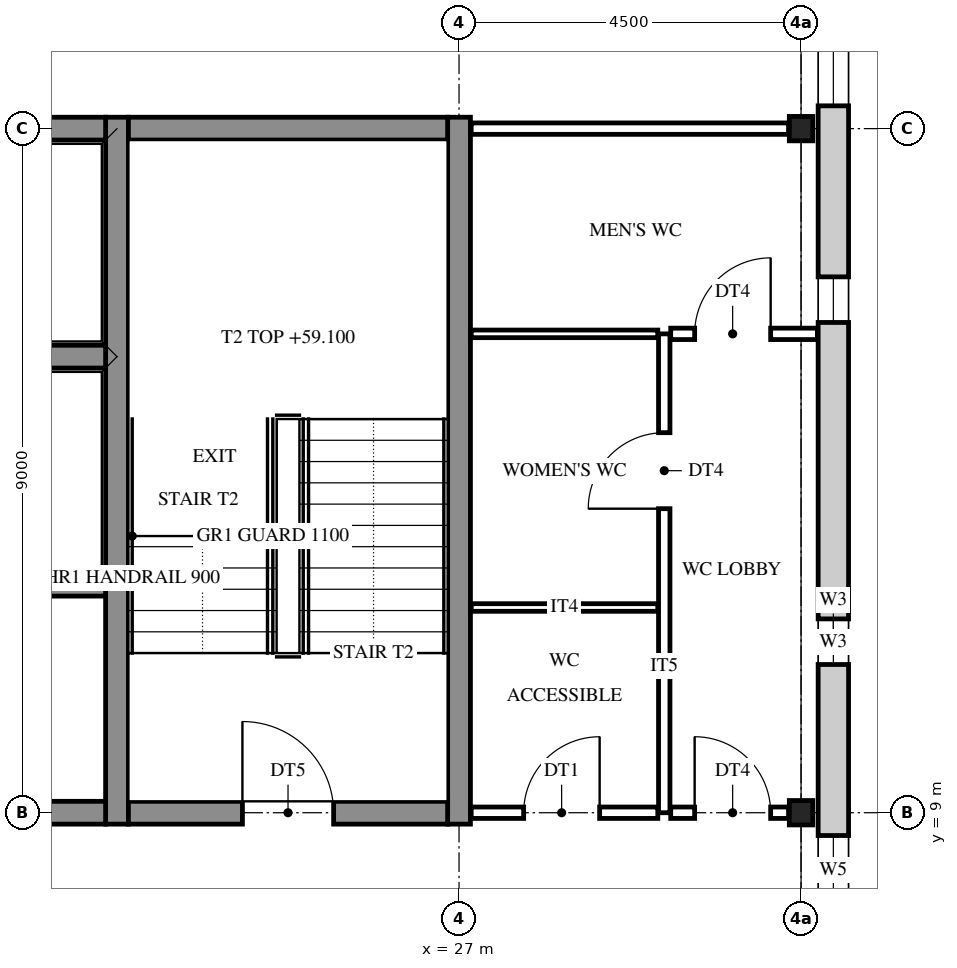
"""IFC4 building model, lengths in metres.
Left out: names, types, materials, properties, quantities, classifications, styles, units other than length and angle.
Written with IfcOpenShell. Run it as: python <this file> out.ifc"""

import sys

from ifc_helpers import new_model, si_unit, direction, frame, frame_2d, origin, origin_2d, place, context, subcontext, project, spatial, rectangle, i_section, extrude, element, fill, save


model = new_model("IFC4")
c1 = context("Model", 3, precision=1e-05, world=origin(), true_north=direction((0.0, 1.0)))
c2 = subcontext(c1, "Body", "Model", "MODEL_VIEW")
j1 = project(units=[si_unit("LENGTHUNIT", "METRE"), si_unit("PLANEANGLEUNIT", "RADIAN")], contexts=[c1])
p1 = place(None, origin())
s1 = spatial("IfcSite", under=j1, at=p1, CompositionType="ELEMENT")
p2 = place(p1, origin())
s2 = spatial("IfcBuilding", under=s1, at=p2, CompositionType="ELEMENT")
p3 = place(p2, frame((0.0, 0.0, 57.0)))
s3 = spatial("IfcBuildingStorey", under=s2, at=p3, CompositionType="ELEMENT", Elevation=57.0)
for number, where, z_axis, x_axis in (
    (1, (31.5, 9.0, 0.0), (0.0, 0.0, 1.0), (1.0, 0.0, 0.0)),
    (2, (31.5, 18.0, 0.0), (0.0, 0.0, 1.0), (1.0, 0.0, 0.0)),
):
    element("IfcColumn", number, at=place(p3, frame(where, z_axis=z_axis, x_axis=x_axis)), inside=s3, PredefinedType="COLUMN", context=c2, shape_type="SweptSolid", body=[
        extrude(i_section(OverallWidth=0.309, OverallDepth=0.321, WebThickness=0.014, FlangeThickness=0.022, FilletRadius=0.017, at=origin_2d()), origin(), (0.0, 0.0, 1.0), 4.2),
    ])
for number, where, z_axis, x_axis in (
    (3, (22.5, 8.85, 0.0), (0.0, 0.0, 1.0), (0.0, 1.0, 0.0)),
    (4, (27.0, 8.85, 0.0), (0.0, 0.0, 1.0), (0.0, 1.0, 0.0)),
):
    element("IfcWall", number, at=place(p3, frame(where, z_axis=z_axis, x_axis=x_axis)), inside=s3, PredefinedType="SHEAR", context=c2, shape_type="SweptSolid", body=[
        extrude(rectangle(XDim=9.3, YDim=0.3, at=frame_2d((4.65, 0.0))), origin(), (0.0, 0.0, 1.0), 4.2),
    ])
p4 = place(p3, frame((19.65, 9.0, 0.0), z_axis=(0.0, 0.0, 1.0), x_axis=(1.0, 0.0, 0.0)))
e5 = element("IfcWall", 5, at=p4, inside=s3, PredefinedType="SHEAR", context=c2, shape_type="SweptSolid", body=[
    extrude(rectangle(XDim=2.7, YDim=0.3, at=frame_2d((1.35, 0.0))), origin(), (0.0, 0.0, 1.0), 4.2),
])
p5 = place(p3, frame((22.65, 9.0, 0.0), z_axis=(0.0, 0.0, 1.0), x_axis=(1.0, 0.0, 0.0)))
e6 = element("IfcWall", 6, at=p5, inside=s3, PredefinedType="SHEAR", context=c2, shape_type="SweptSolid", body=[
    extrude(rectangle(XDim=4.2, YDim=0.3, at=frame_2d((2.1, 0.0))), origin(), (0.0, 0.0, 1.0), 4.2),
])
p6 = place(p5, frame((1.5, 0.0, 0.0)))
e7 = element("IfcOpeningElement", 7, at=p6, cuts=e6, PredefinedType="OPENING", context=c2, shape_type="SweptSolid", body=[
    extrude(rectangle(XDim=1.2, YDim=2.1, at=frame_2d((0.6, 1.05))), frame((0.0, 0.16, 0.0), z_axis=(0.0, -1.0, 0.0), x_axis=(1.0, 0.0, 0.0)), (0.0, 0.0, 1.0), 0.32),
])
for number, where, z_axis, x_axis in (
    (8, (19.65, 12.0, 0.0), (0.0, 0.0, 1.0), (1.0, 0.0, 0.0)),
    (9, (19.65, 15.0, 0.0), (0.0, 0.0, 1.0), (1.0, 0.0, 0.0)),
    (10, (19.65, 18.0, 0.0), (0.0, 0.0, 1.0), (1.0, 0.0, 0.0)),
):
    element("IfcWall", number, at=place(p3, frame(where, z_axis=z_axis, x_axis=x_axis)), inside=s3, PredefinedType="SHEAR", context=c2, shape_type="SweptSolid", body=[
        extrude(rectangle(XDim=2.7, YDim=0.3, at=frame_2d((1.35, 0.0))), origin(), (0.0, 0.0, 1.0), 4.2),
    ])
p7 = place(p3, frame((22.65, 18.0, 0.0), z_axis=(0.0, 0.0, 1.0), x_axis=(1.0, 0.0, 0.0)))
e11 = element("IfcWall", 11, at=p7, inside=s3, PredefinedType="SHEAR", context=c2, shape_type="SweptSolid", body=[
    extrude(rectangle(XDim=4.2, YDim=0.3, at=frame_2d((2.1, 0.0))), origin(), (0.0, 0.0, 1.0), 4.2),
])
p8 = place(p3, frame((31.925, 27.225, 0.0), z_axis=(0.0, 0.0, 1.0), x_axis=(0.0, -1.0, 0.0)))
e12 = element("IfcWall", 12, at=p8, inside=s3, PredefinedType="STANDARD", context=c2, shape_type="SweptSolid", body=[
    extrude(rectangle(XDim=27.45, YDim=0.4, at=frame_2d((13.725, 0.0))), origin(), (0.0, 0.0, 1.0), 4.2),
])
p9 = place(p8, frame((26.025, 0.0, 0.9)))
e13 = element("IfcOpeningElement", 13, at=p9, cuts=e12, PredefinedType="OPENING", context=c2, shape_type="SweptSolid", body=[
    extrude(rectangle(XDim=0.9, YDim=2.0, at=frame_2d((0.45, 1.0))), frame((0.0, 0.21, 0.0), z_axis=(0.0, -1.0, 0.0), x_axis=(1.0, 0.0, 0.0)), (0.0, 0.0, 1.0), 0.42),
])
p10 = place(p8, frame((18.525, 0.0, 0.9)))
e14 = element("IfcOpeningElement", 14, at=p10, cuts=e12, PredefinedType="OPENING", context=c2, shape_type="SweptSolid", body=[
    extrude(rectangle(XDim=0.9, YDim=2.0, at=frame_2d((0.45, 1.0))), frame((0.0, 0.21, 0.0), z_axis=(0.0, -1.0, 0.0), x_axis=(1.0, 0.0, 0.0)), (0.0, 0.0, 1.0), 0.42),
])
p11 = place(p8, frame((15.675, 0.0, 1.6)))
e15 = element("IfcOpeningElement", 15, at=p11, cuts=e12, PredefinedType="OPENING", context=c2, shape_type="SweptSolid", body=[
    extrude(rectangle(XDim=0.6, YDim=0.9, at=frame_2d((0.3, 0.45))), frame((0.0, 0.21, 0.0), z_axis=(0.0, -1.0, 0.0), x_axis=(1.0, 0.0, 0.0)), (0.0, 0.0, 1.0), 0.42),
])
p12 = place(p8, frame((11.175, 0.0, 1.6)))
e16 = element("IfcOpeningElement", 16, at=p12, cuts=e12, PredefinedType="OPENING", context=c2, shape_type="SweptSolid", body=[
    extrude(rectangle(XDim=0.6, YDim=0.9, at=frame_2d((0.3, 0.45))), frame((0.0, 0.21, 0.0), z_axis=(0.0, -1.0, 0.0), x_axis=(1.0, 0.0, 0.0)), (0.0, 0.0, 1.0), 0.42),
])
p13 = place(p8, frame((8.025, 0.0, 0.9)))
e17 = element("IfcOpeningElement", 17, at=p13, cuts=e12, PredefinedType="OPENING", context=c2, shape_type="SweptSolid", body=[
    extrude(rectangle(XDim=0.9, YDim=2.0, at=frame_2d((0.45, 1.0))), frame((0.0, 0.21, 0.0), z_axis=(0.0, -1.0, 0.0), x_axis=(1.0, 0.0, 0.0)), (0.0, 0.0, 1.0), 0.42),
])
p14 = place(p8, frame((0.525, 0.0, 0.9)))
e18 = element("IfcOpeningElement", 18, at=p14, cuts=e12, PredefinedType="OPENING", context=c2, shape_type="SweptSolid", body=[
    extrude(rectangle(XDim=0.9, YDim=2.0, at=frame_2d((0.45, 1.0))), frame((0.0, 0.21, 0.0), z_axis=(0.0, -1.0, 0.0), x_axis=(1.0, 0.0, 0.0)), (0.0, 0.0, 1.0), 0.42),
])
p15 = place(p3, frame((29.7, 9.0, 0.0), z_axis=(0.0, 0.0, 1.0), x_axis=(0.0, 1.0, 0.0)))
e19 = element("IfcWall", 19, at=p15, inside=s3, PredefinedType="PARTITIONING", context=c2, shape_type="SweptSolid", body=[
    extrude(rectangle(XDim=6.3, YDim=0.15, at=frame_2d((3.15, 0.0))), origin(), (0.0, 0.0, 1.0), 3.542),
])
p16 = place(p15, frame((4.0, 0.0, 0.0)))
e20 = element("IfcOpeningElement", 20, at=p16, cuts=e19, PredefinedType="OPENING", context=c2, shape_type="SweptSolid", body=[
    extrude(rectangle(XDim=1.0, YDim=2.1, at=frame_2d((0.5, 1.05))), frame((0.0, 0.085, 0.0), z_axis=(0.0, -1.0, 0.0), x_axis=(1.0, 0.0, 0.0)), (0.0, 0.0, 1.0), 0.17),
])
p17 = place(p3, frame((27.16, 9.0, 0.0), z_axis=(0.0, 0.0, 1.0), x_axis=(1.0, 0.0, 0.0)))
e21 = element("IfcWall", 21, at=p17, inside=s3, PredefinedType="PARTITIONING", context=c2, shape_type="SweptSolid", body=[
    extrude(rectangle(XDim=2.455, YDim=0.15, at=frame_2d((1.228, 0.0))), origin(), (0.0, 0.0, 1.0), 3.542),
])
p18 = place(p17, frame((0.69, 0.0, 0.0)))
e22 = element("IfcOpeningElement", 22, at=p18, cuts=e21, PredefinedType="OPENING", context=c2, shape_type="SweptSolid", body=[
    extrude(rectangle(XDim=1.0, YDim=2.1, at=frame_2d((0.5, 1.05))), frame((0.0, 0.085, 0.0), z_axis=(0.0, -1.0, 0.0), x_axis=(1.0, 0.0, 0.0)), (0.0, 0.0, 1.0), 0.17),
])
p19 = place(p3, frame((29.785, 9.0, 0.0), z_axis=(0.0, 0.0, 1.0), x_axis=(1.0, 0.0, 0.0)))
e23 = element("IfcWall", 23, at=p19, inside=s3, PredefinedType="PARTITIONING", context=c2, shape_type="SweptSolid", body=[
    extrude(rectangle(XDim=1.551, YDim=0.15, at=frame_2d((0.775, 0.0))), origin(), (0.0, 0.0, 1.0), 3.542),
])
p20 = place(p19, frame((0.315, 0.0, 0.0)))
e24 = element("IfcOpeningElement", 24, at=p20, cuts=e23, PredefinedType="OPENING", context=c2, shape_type="SweptSolid", body=[
    extrude(rectangle(XDim=1.0, YDim=2.1, at=frame_2d((0.5, 1.05))), frame((0.0, 0.085, 0.0), z_axis=(0.0, -1.0, 0.0), x_axis=(1.0, 0.0, 0.0)), (0.0, 0.0, 1.0), 0.17),
])
for number, where, z_axis, x_axis in (
    (25, (27.16, 11.7, 0.0), (0.0, 0.0, 1.0), (1.0, 0.0, 0.0)),
    (26, (27.16, 15.3, 0.0), (0.0, 0.0, 1.0), (1.0, 0.0, 0.0)),
):
    element("IfcWall", number, at=place(p3, frame(where, z_axis=z_axis, x_axis=x_axis)), inside=s3, PredefinedType="PARTITIONING", context=c2, shape_type="SweptSolid", body=[
        extrude(rectangle(XDim=2.455, YDim=0.1, at=frame_2d((1.228, 0.0))), origin(), (0.0, 0.0, 1.0), 3.542),
    ])
p21 = place(p3, frame((29.785, 15.3, 0.0), z_axis=(0.0, 0.0, 1.0), x_axis=(1.0, 0.0, 0.0)))
e27 = element("IfcWall", 27, at=p21, inside=s3, PredefinedType="PARTITIONING", context=c2, shape_type="SweptSolid", body=[
    extrude(rectangle(XDim=1.93, YDim=0.15, at=frame_2d((0.965, 0.0))), origin(), (0.0, 0.0, 1.0), 3.542),
])
p22 = place(p21, frame((0.315, 0.0, 0.0)))
e28 = element("IfcOpeningElement", 28, at=p22, cuts=e27, PredefinedType="OPENING", context=c2, shape_type="SweptSolid", body=[
    extrude(rectangle(XDim=1.0, YDim=2.1, at=frame_2d((0.5, 1.05))), frame((0.0, 0.085, 0.0), z_axis=(0.0, -1.0, 0.0), x_axis=(1.0, 0.0, 0.0)), (0.0, 0.0, 1.0), 0.17),
])
p23 = place(p3, frame((27.16, 18.0, 0.0), z_axis=(0.0, 0.0, 1.0), x_axis=(1.0, 0.0, 0.0)))
e29 = element("IfcWall", 29, at=p23, inside=s3, PredefinedType="PARTITIONING", context=c2, shape_type="SweptSolid", body=[
    extrude(rectangle(XDim=4.176, YDim=0.15, at=frame_2d((2.088, 0.0))), origin(), (0.0, 0.0, 1.0), 3.542),
])
p24 = place(p10, origin())
e30 = element("IfcWindow", 30, at=p24, inside=s3, PartitioningType="SINGLE_PANEL", PredefinedType="WINDOW", context=c2, shape_type="SweptSolid", body=[
    extrude(rectangle(XDim=0.9, YDim=2.0, at=frame_2d((0.45, 1.0))), frame((0.0, 0.03, 0.0), z_axis=(0.0, -1.0, 0.0), x_axis=(1.0, 0.0, 0.0)), (0.0, 0.0, 1.0), 0.06),
])
fill(e14, e30)
p25 = place(p11, origin())
e31 = element("IfcWindow", 31, at=p25, inside=s3, PartitioningType="SINGLE_PANEL", PredefinedType="WINDOW", context=c2, shape_type="SweptSolid", body=[
    extrude(rectangle(XDim=0.6, YDim=0.9, at=frame_2d((0.3, 0.45))), frame((0.0, 0.03, 0.0), z_axis=(0.0, -1.0, 0.0), x_axis=(1.0, 0.0, 0.0)), (0.0, 0.0, 1.0), 0.06),
])
fill(e15, e31)
p26 = place(p12, origin())
e32 = element("IfcWindow", 32, at=p26, inside=s3, PartitioningType="SINGLE_PANEL", PredefinedType="WINDOW", context=c2, shape_type="SweptSolid", body=[
    extrude(rectangle(XDim=0.6, YDim=0.9, at=frame_2d((0.3, 0.45))), frame((0.0, 0.03, 0.0), z_axis=(0.0, -1.0, 0.0), x_axis=(1.0, 0.0, 0.0)), (0.0, 0.0, 1.0), 0.06),
])
fill(e16, e32)
p27 = place(p13, origin())
e33 = element("IfcWindow", 33, at=p27, inside=s3, PartitioningType="SINGLE_PANEL", PredefinedType="WINDOW", context=c2, shape_type="SweptSolid", body=[
    extrude(rectangle(XDim=0.9, YDim=2.0, at=frame_2d((0.45, 1.0))), frame((0.0, 0.03, 0.0), z_axis=(0.0, -1.0, 0.0), x_axis=(1.0, 0.0, 0.0)), (0.0, 0.0, 1.0), 0.06),
])
fill(e17, e33)
p28 = place(p6, origin())
e34 = element("IfcDoor", 34, at=p28, inside=s3, OperationType="SINGLE_SWING_LEFT", PredefinedType="DOOR", context=c2, shape_type="SweptSolid", body=[
    extrude(rectangle(XDim=1.2, YDim=2.1, at=frame_2d((0.6, 1.05))), frame((0.0, 0.025, 0.0), z_axis=(0.0, -1.0, 0.0), x_axis=(1.0, 0.0, 0.0)), (0.0, 0.0, 1.0), 0.05),
])
fill(e7, e34)
p29 = place(p18, origin())
e35 = element("IfcDoor", 35, at=p29, inside=s3, OperationType="SINGLE_SWING_RIGHT", PredefinedType="DOOR", context=c2, shape_type="SweptSolid", body=[
    extrude(rectangle(XDim=1.0, YDim=2.1, at=frame_2d((0.5, 1.05))), frame((0.0, 0.025, 0.0), z_axis=(0.0, -1.0, 0.0), x_axis=(1.0, 0.0, 0.0)), (0.0, 0.0, 1.0), 0.05),
])
fill(e22, e35)
p30 = place(p16, origin())
e36 = element("IfcDoor", 36, at=p30, inside=s3, OperationType="SINGLE_SWING_LEFT", PredefinedType="DOOR", context=c2, shape_type="SweptSolid", body=[
    extrude(rectangle(XDim=1.0, YDim=2.1, at=frame_2d((0.5, 1.05))), frame((0.0, 0.025, 0.0), z_axis=(0.0, -1.0, 0.0), x_axis=(1.0, 0.0, 0.0)), (0.0, 0.0, 1.0), 0.05),
])
fill(e20, e36)
p31 = place(p22, origin())
e37 = element("IfcDoor", 37, at=p31, inside=s3, OperationType="SINGLE_SWING_RIGHT", PredefinedType="DOOR", context=c2, shape_type="SweptSolid", body=[
    extrude(rectangle(XDim=1.0, YDim=2.1, at=frame_2d((0.5, 1.05))), frame((0.0, 0.025, 0.0), z_axis=(0.0, -1.0, 0.0), x_axis=(1.0, 0.0, 0.0)), (0.0, 0.0, 1.0), 0.05),
])
fill(e28, e37)
p32 = place(p20, origin())
e38 = element("IfcDoor", 38, at=p32, inside=s3, OperationType="SINGLE_SWING_LEFT", PredefinedType="DOOR", context=c2, shape_type="SweptSolid", body=[
    extrude(rectangle(XDim=1.0, YDim=2.1, at=frame_2d((0.5, 1.05))), frame((0.0, 0.025, 0.0), z_axis=(0.0, -1.0, 0.0), x_axis=(1.0, 0.0, 0.0)), (0.0, 0.0, 1.0), 0.05),
])
fill(e24, e38)
save(model, sys.argv[1])
